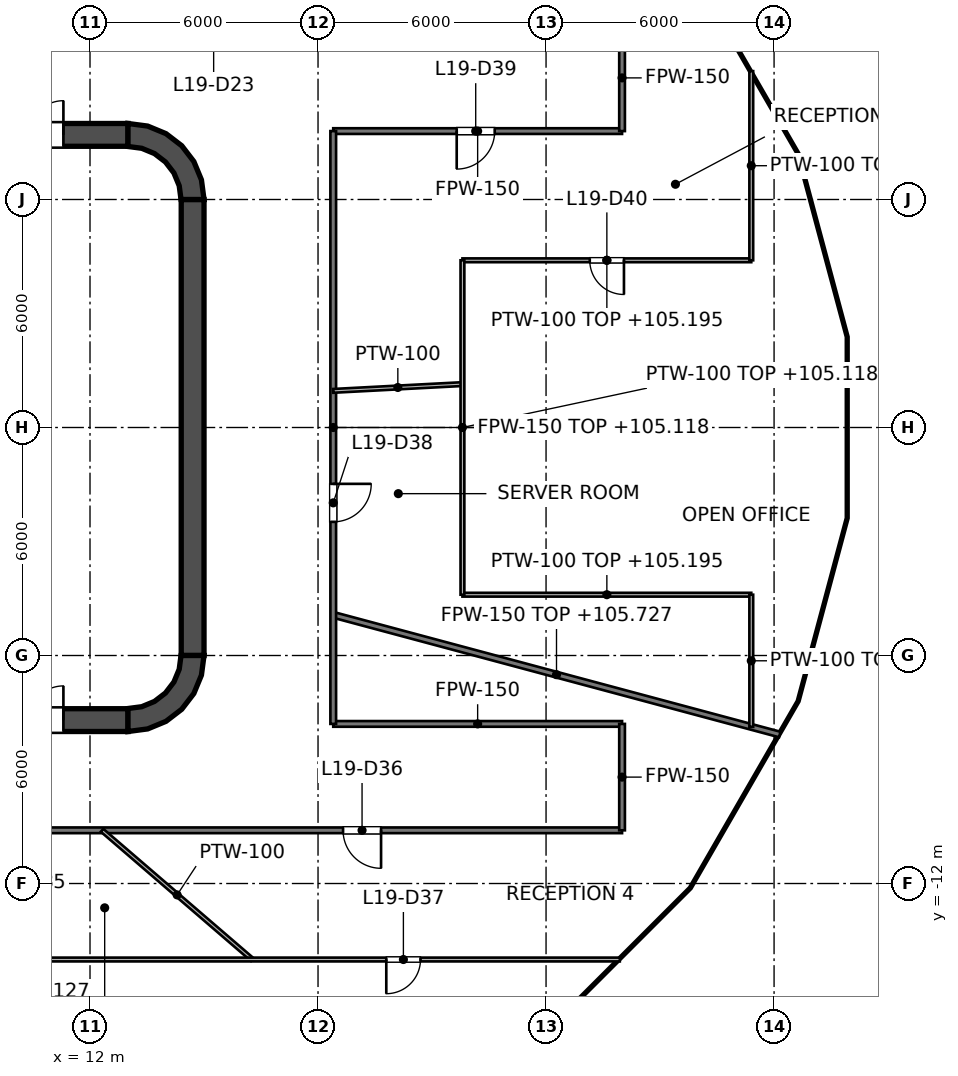
"""IFC4 building model, lengths in metres.
Left out: names, types, materials, properties, quantities, classifications, styles, units other than length and angle.
Written with IfcOpenShell. Run it as: python <this file> out.ifc"""

import sys

from ifc_helpers import new_model, si_unit, direction, frame, frame_2d, origin, place, context, subcontext, project, spatial, polyline, rectangle, outline, extrude, element, fill, save


model = new_model("IFC4")
c1 = context("Model", 3, precision=1e-05, world=origin(), true_north=direction((0.0, 1.0)))
c2 = subcontext(c1, "Body", "Model", "MODEL_VIEW")
j1 = project(units=[si_unit("LENGTHUNIT", "METRE"), si_unit("PLANEANGLEUNIT", "RADIAN")], contexts=[c1])
p1 = place(None, origin())
s1 = spatial("IfcSite", under=j1, at=p1, CompositionType="ELEMENT")
p2 = place(p1, origin())
s2 = spatial("IfcBuilding", under=s1, at=p2, CompositionType="ELEMENT")
p3 = place(p2, frame((0.0, 0.0, 102.0)))
s3 = spatial("IfcBuildingStorey", under=s2, at=p3, CompositionType="ELEMENT", Elevation=102.0)
p4 = place(p3, frame((-13.0, 7.7, 0.0), z_axis=(0.0, 0.0, 1.0), x_axis=(1.0, 0.0, 0.0)))
e1 = element("IfcWall", 1, at=p4, inside=s3, PredefinedType="SHEAR", context=c2, shape_type="SweptSolid", body=[
    extrude(rectangle(XDim=26.0, YDim=0.6, at=frame_2d((13.0, 0.0))), origin(), (0.0, 0.0, 1.0), 4.2),
])
p5 = place(p4, frame((1.7, 0.0, 0.0)))
e2 = element("IfcOpeningElement", 2, at=p5, cuts=e1, PredefinedType="OPENING", context=c2, shape_type="SweptSolid", body=[
    extrude(rectangle(XDim=1.8, YDim=2.1, at=frame_2d((0.9, 1.05))), frame((0.0, 0.3, 0.0), z_axis=(0.0, -1.0, 0.0), x_axis=(1.0, 0.0, 0.0)), (0.0, 0.0, 1.0), 0.6),
])
p6 = place(p4, frame((22.5, 0.0, 0.0)))
e3 = element("IfcOpeningElement", 3, at=p6, cuts=e1, PredefinedType="OPENING", context=c2, shape_type="SweptSolid", body=[
    extrude(rectangle(XDim=1.8, YDim=2.1, at=frame_2d((0.9, 1.05))), frame((0.0, 0.3, 0.0), z_axis=(0.0, -1.0, 0.0), x_axis=(1.0, 0.0, 0.0)), (0.0, 0.0, 1.0), 0.6),
])
p7 = place(p3, frame((-13.0, -7.7, 0.0), z_axis=(0.0, 0.0, 1.0), x_axis=(1.0, 0.0, 0.0)))
e4 = element("IfcWall", 4, at=p7, inside=s3, PredefinedType="SHEAR", context=c2, shape_type="SweptSolid", body=[
    extrude(rectangle(XDim=26.0, YDim=0.6, at=frame_2d((13.0, 0.0))), origin(), (0.0, 0.0, 1.0), 4.2),
])
p8 = place(p7, frame((1.7, 0.0, 0.0)))
e5 = element("IfcOpeningElement", 5, at=p8, cuts=e4, PredefinedType="OPENING", context=c2, shape_type="SweptSolid", body=[
    extrude(rectangle(XDim=1.8, YDim=2.1, at=frame_2d((0.9, 1.05))), frame((0.0, 0.3, 0.0), z_axis=(0.0, -1.0, 0.0), x_axis=(1.0, 0.0, 0.0)), (0.0, 0.0, 1.0), 0.6),
])
p9 = place(p7, frame((22.5, 0.0, 0.0)))
e6 = element("IfcOpeningElement", 6, at=p9, cuts=e4, PredefinedType="OPENING", context=c2, shape_type="SweptSolid", body=[
    extrude(rectangle(XDim=1.8, YDim=2.1, at=frame_2d((0.9, 1.05))), frame((0.0, 0.3, 0.0), z_axis=(0.0, -1.0, 0.0), x_axis=(1.0, 0.0, 0.0)), (0.0, 0.0, 1.0), 0.6),
])
p10 = place(p3, frame((14.7, -6.0, 0.0), z_axis=(0.0, 0.0, 1.0), x_axis=(0.0, 1.0, 0.0)))
e7 = element("IfcWall", 7, at=p10, inside=s3, PredefinedType="SHEAR", context=c2, shape_type="SweptSolid", body=[
    extrude(rectangle(XDim=12.0, YDim=0.6, at=frame_2d((6.0, 0.0))), origin(), (0.0, 0.0, 1.0), 4.2),
])
p11 = place(p3, origin())
e8 = element("IfcWall", 8, at=p11, inside=s3, PredefinedType="SHEAR", context=c2, shape_type="SweptSolid", body=[
    extrude(outline(polyline([(13.0, 8.0), (13.0, 7.395), (13.361, 7.347), (13.698, 7.208), (13.986, 6.986), (14.208, 6.698), (14.347, 6.361), (14.395, 6.0), (15.0, 6.0), (14.932, 6.518), (14.732, 7.0), (14.414, 7.414), (14.0, 7.732), (13.518, 7.932), (13.0, 8.0)])), origin(), (0.0, 0.0, 1.0), 4.2),
])
e9 = element("IfcWall", 9, at=p11, inside=s3, PredefinedType="SHEAR", context=c2, shape_type="SweptSolid", body=[
    extrude(outline(polyline([(15.0, -6.0), (14.395, -6.0), (14.347, -6.361), (14.208, -6.698), (13.986, -6.986), (13.698, -7.208), (13.361, -7.347), (13.0, -7.395), (13.0, -8.0), (13.518, -7.932), (14.0, -7.732), (14.414, -7.414), (14.732, -7.0), (14.932, -6.518), (15.0, -6.0)])), origin(), (0.0, 0.0, 1.0), 4.2),
])
p12 = place(p3, frame((11.8, -7.4, 0.0), z_axis=(0.0, 0.0, 1.0), x_axis=(0.0, 1.0, 0.0)))
e10 = element("IfcWall", 10, at=p12, inside=s3, PredefinedType="SOLIDWALL", context=c2, shape_type="SweptSolid", body=[
    extrude(rectangle(XDim=14.8, YDim=0.4, at=frame_2d((7.4, 0.0))), origin(), (0.0, 0.0, 1.0), 4.05),
])
p13 = place(p12, frame((11.2, 0.0, 0.0)))
e11 = element("IfcOpeningElement", 11, at=p13, cuts=e10, PredefinedType="OPENING", context=c2, shape_type="SweptSolid", body=[
    extrude(rectangle(XDim=1.1, YDim=2.1, at=frame_2d((0.55, 1.05))), frame((0.0, 0.2, 0.0), z_axis=(0.0, -1.0, 0.0), x_axis=(1.0, 0.0, 0.0)), (0.0, 0.0, 1.0), 0.4),
])
p14 = place(p12, frame((8.3, 0.0, 0.0)))
e12 = element("IfcOpeningElement", 12, at=p14, cuts=e10, PredefinedType="OPENING", context=c2, shape_type="SweptSolid", body=[
    extrude(rectangle(XDim=1.1, YDim=2.1, at=frame_2d((0.55, 1.05))), frame((0.0, 0.2, 0.0), z_axis=(0.0, -1.0, 0.0), x_axis=(1.0, 0.0, 0.0)), (0.0, 0.0, 1.0), 0.4),
])
p15 = place(p12, frame((5.4, 0.0, 0.0)))
e13 = element("IfcOpeningElement", 13, at=p15, cuts=e10, PredefinedType="OPENING", context=c2, shape_type="SweptSolid", body=[
    extrude(rectangle(XDim=1.1, YDim=2.1, at=frame_2d((0.55, 1.05))), frame((0.0, 0.2, 0.0), z_axis=(0.0, -1.0, 0.0), x_axis=(1.0, 0.0, 0.0)), (0.0, 0.0, 1.0), 0.4),
])
p16 = place(p12, frame((13.552, 0.0, 0.0)))
e14 = element("IfcOpeningElement", 14, at=p16, cuts=e10, PredefinedType="OPENING", context=c2, shape_type="SweptSolid", body=[
    extrude(rectangle(XDim=0.9, YDim=2.1, at=frame_2d((0.45, 1.05))), frame((0.0, 0.2, 0.0), z_axis=(0.0, -1.0, 0.0), x_axis=(1.0, 0.0, 0.0)), (0.0, 0.0, 1.0), 0.4),
])
p17 = place(p12, frame((0.347, 0.0, 0.0)))
e15 = element("IfcOpeningElement", 15, at=p17, cuts=e10, PredefinedType="OPENING", context=c2, shape_type="SweptSolid", body=[
    extrude(rectangle(XDim=0.9, YDim=2.1, at=frame_2d((0.45, 1.05))), frame((0.0, 0.2, 0.0), z_axis=(0.0, -1.0, 0.0), x_axis=(1.0, 0.0, 0.0)), (0.0, 0.0, 1.0), 0.4),
])
e16 = element("IfcWall", 16, at=p11, inside=s3, PredefinedType="SOLIDWALL", context=c2, shape_type="SweptSolid", body=[
    extrude(outline(polyline([(12.0, -5.675), (12.0, -5.925), (14.15, -5.925), (14.4, -5.925), (14.4, -5.675), (14.4, -3.025), (14.4, -2.775), (14.4, -0.125), (14.4, 0.125), (14.4, 2.775), (14.4, 3.025), (14.4, 5.675), (14.4, 5.925), (14.15, 5.925), (12.0, 5.925), (12.0, 5.675), (14.15, 5.675), (14.15, 3.025), (12.0, 3.025), (12.0, 2.775), (14.15, 2.775), (14.15, 0.125), (12.0, 0.125), (12.0, -0.125), (14.15, -0.125), (14.15, -2.775), (12.0, -2.775), (12.0, -3.025), (14.15, -3.025), (14.15, -5.675), (12.0, -5.675)])), origin(), (0.0, 0.0, 1.0), 4.05),
])
p18 = place(p3, frame((18.4, -4.93, 0.0), z_axis=(0.0, 0.0, 1.0), x_axis=(0.965910063501, -0.258877865465, 0.0)))
e17 = element("IfcWall", 17, at=p18, inside=s3, PredefinedType="PARTITIONING", context=c2, shape_type="SweptSolid", body=[
    extrude(rectangle(XDim=12.165, YDim=0.15, at=frame_2d((6.083, 0.0))), origin(), (0.0, 0.0, 1.0), 3.727),
])
p19 = place(p3, frame((-26.0, -10.6, 0.0), z_axis=(0.0, 0.0, 1.0), x_axis=(1.0, 0.0, 0.0)))
e18 = element("IfcWall", 18, at=p19, inside=s3, PredefinedType="PARTITIONING", context=c2, shape_type="SweptSolid", body=[
    extrude(rectangle(XDim=52.0, YDim=0.15, at=frame_2d((26.0, 0.0))), origin(), (0.0, 0.0, 1.0), 3.127),
])
p20 = place(p19, frame((9.34, 0.0, 0.0)))
e19 = element("IfcOpeningElement", 19, at=p20, cuts=e18, PredefinedType="OPENING", context=c2, shape_type="SweptSolid", body=[
    extrude(rectangle(XDim=1.2, YDim=2.1, at=frame_2d((0.6, 1.05))), frame((0.0, 0.075, 0.0), z_axis=(0.0, -1.0, 0.0), x_axis=(1.0, 0.0, 0.0)), (0.0, 0.0, 1.0), 0.15),
])
p21 = place(p19, frame((21.313, 0.0, 0.0)))
e20 = element("IfcOpeningElement", 20, at=p21, cuts=e18, PredefinedType="OPENING", context=c2, shape_type="SweptSolid", body=[
    extrude(rectangle(XDim=1.0, YDim=2.1, at=frame_2d((0.5, 1.05))), frame((0.0, 0.075, 0.0), z_axis=(0.0, -1.0, 0.0), x_axis=(1.0, 0.0, 0.0)), (0.0, 0.0, 1.0), 0.15),
])
p22 = place(p19, frame((25.793, 0.0, 0.0)))
e21 = element("IfcOpeningElement", 21, at=p22, cuts=e18, PredefinedType="OPENING", context=c2, shape_type="SweptSolid", body=[
    extrude(rectangle(XDim=1.0, YDim=2.1, at=frame_2d((0.5, 1.05))), frame((0.0, 0.075, 0.0), z_axis=(0.0, -1.0, 0.0), x_axis=(1.0, 0.0, 0.0)), (0.0, 0.0, 1.0), 0.15),
])
p23 = place(p19, frame((30.25, 0.0, 0.0)))
e22 = element("IfcOpeningElement", 22, at=p23, cuts=e18, PredefinedType="OPENING", context=c2, shape_type="SweptSolid", body=[
    extrude(rectangle(XDim=1.0, YDim=2.1, at=frame_2d((0.5, 1.05))), frame((0.0, 0.075, 0.0), z_axis=(0.0, -1.0, 0.0), x_axis=(1.0, 0.0, 0.0)), (0.0, 0.0, 1.0), 0.15),
])
p24 = place(p19, frame((34.989, 0.0, 0.0)))
e23 = element("IfcOpeningElement", 23, at=p24, cuts=e18, PredefinedType="OPENING", context=c2, shape_type="SweptSolid", body=[
    extrude(rectangle(XDim=1.0, YDim=2.1, at=frame_2d((0.5, 1.05))), frame((0.0, 0.075, 0.0), z_axis=(0.0, -1.0, 0.0), x_axis=(1.0, 0.0, 0.0)), (0.0, 0.0, 1.0), 0.15),
])
p25 = place(p19, frame((44.658, 0.0, 0.0)))
e24 = element("IfcOpeningElement", 24, at=p25, cuts=e18, PredefinedType="OPENING", context=c2, shape_type="SweptSolid", body=[
    extrude(rectangle(XDim=1.0, YDim=2.1, at=frame_2d((0.5, 1.05))), frame((0.0, 0.075, 0.0), z_axis=(0.0, -1.0, 0.0), x_axis=(1.0, 0.0, 0.0)), (0.0, 0.0, 1.0), 0.15),
])
p26 = place(p3, frame((18.4, -7.8, 0.0), z_axis=(0.0, 0.0, 1.0), x_axis=(1.0, 0.0, 0.0)))
e25 = element("IfcWall", 25, at=p26, inside=s3, PredefinedType="PARTITIONING", context=c2, shape_type="SweptSolid", body=[
    extrude(rectangle(XDim=7.6, YDim=0.15, at=frame_2d((3.8, 0.0))), origin(), (0.0, 0.0, 1.0), 3.276),
])
p27 = place(p3, frame((18.4, 7.8, 0.0), z_axis=(0.0, 0.0, 1.0), x_axis=(1.0, 0.0, 0.0)))
e26 = element("IfcWall", 26, at=p27, inside=s3, PredefinedType="PARTITIONING", context=c2, shape_type="SweptSolid", body=[
    extrude(rectangle(XDim=7.6, YDim=0.15, at=frame_2d((3.8, 0.0))), origin(), (0.0, 0.0, 1.0), 3.276),
])
p28 = place(p27, frame((3.249, 0.0, 0.0)))
e27 = element("IfcOpeningElement", 27, at=p28, cuts=e26, PredefinedType="OPENING", context=c2, shape_type="SweptSolid", body=[
    extrude(rectangle(XDim=1.0, YDim=2.1, at=frame_2d((0.5, 1.05))), frame((0.0, 0.075, 0.0), z_axis=(0.0, -1.0, 0.0), x_axis=(1.0, 0.0, 0.0)), (0.0, 0.0, 1.0), 0.15),
])
for number, where, z_axis, x_axis in (
    (28, (26.0, -10.6, 0.0), (0.0, 0.0, 1.0), (0.0, 1.0, 0.0)),
    (29, (26.0, 7.8, 0.0), (0.0, 0.0, 1.0), (0.0, 1.0, 0.0)),
):
    element("IfcWall", number, at=place(p3, frame(where, z_axis=z_axis, x_axis=x_axis)), inside=s3, PredefinedType="PARTITIONING", context=c2, shape_type="SweptSolid", body=[
        extrude(rectangle(XDim=2.8, YDim=0.15, at=frame_2d((1.4, 0.0))), origin(), (0.0, 0.0, 1.0), 3.276),
    ])
p29 = place(p3, frame((18.4, -7.8, 0.0), z_axis=(0.0, 0.0, 1.0), x_axis=(0.0, 1.0, 0.0)))
e30 = element("IfcWall", 30, at=p29, inside=s3, PredefinedType="PARTITIONING", context=c2, shape_type="SweptSolid", body=[
    extrude(rectangle(XDim=15.6, YDim=0.15, at=frame_2d((7.8, 0.0))), origin(), (0.0, 0.0, 1.0), 3.118),
])
p30 = place(p29, frame((5.317, 0.0, 0.0)))
e31 = element("IfcOpeningElement", 31, at=p30, cuts=e30, PredefinedType="OPENING", context=c2, shape_type="SweptSolid", body=[
    extrude(rectangle(XDim=1.0, YDim=2.1, at=frame_2d((0.5, 1.05))), frame((0.0, 0.075, 0.0), z_axis=(0.0, -1.0, 0.0), x_axis=(1.0, 0.0, 0.0)), (0.0, 0.0, 1.0), 0.15),
])
p31 = place(p3, frame((12.317, -10.6, 0.0), z_axis=(0.0, 0.0, 1.0), x_axis=(0.758005488553, -0.652248173109, 0.0)))
e32 = element("IfcWall", 32, at=p31, inside=s3, PredefinedType="PARTITIONING", context=c2, shape_type="SweptSolid", body=[
    extrude(rectangle(XDim=5.213, YDim=0.1, at=frame_2d((2.606, 0.0))), origin(), (0.0, 0.0, 1.0), 4.05),
])
p32 = place(p3, frame((-8.083, -14.0, 0.0), z_axis=(0.0, 0.0, 1.0), x_axis=(1.0, 0.0, 0.0)))
e33 = element("IfcWall", 33, at=p32, inside=s3, PredefinedType="PARTITIONING", context=c2, shape_type="SweptSolid", body=[
    extrude(rectangle(XDim=34.024, YDim=0.1, at=frame_2d((17.012, 0.0))), origin(), (0.0, 0.0, 1.0), 3.127),
])
p33 = place(p32, frame((7.52, 0.0, 0.0)))
e34 = element("IfcOpeningElement", 34, at=p33, cuts=e33, PredefinedType="OPENING", context=c2, shape_type="SweptSolid", body=[
    extrude(rectangle(XDim=1.8, YDim=2.1, at=frame_2d((0.9, 1.05))), frame((0.0, 0.05, 0.0), z_axis=(0.0, -1.0, 0.0), x_axis=(1.0, 0.0, 0.0)), (0.0, 0.0, 1.0), 0.1),
])
p34 = place(p32, frame((27.879, 0.0, 0.0)))
e35 = element("IfcOpeningElement", 35, at=p34, cuts=e33, PredefinedType="OPENING", context=c2, shape_type="SweptSolid", body=[
    extrude(rectangle(XDim=0.9, YDim=2.1, at=frame_2d((0.45, 1.05))), frame((0.0, 0.05, 0.0), z_axis=(0.0, -1.0, 0.0), x_axis=(1.0, 0.0, 0.0)), (0.0, 0.0, 1.0), 0.1),
])
p35 = place(p3, frame((21.8, -4.4, 0.0), z_axis=(0.0, 0.0, 1.0), x_axis=(1.0, 0.0, 0.0)))
e36 = element("IfcWall", 36, at=p35, inside=s3, PredefinedType="PARTITIONING", context=c2, shape_type="SweptSolid", body=[
    extrude(rectangle(XDim=7.6, YDim=0.1, at=frame_2d((3.8, 0.0))), origin(), (0.0, 0.0, 1.0), 3.195),
])
p36 = place(p3, frame((21.8, 4.4, 0.0), z_axis=(0.0, 0.0, 1.0), x_axis=(1.0, 0.0, 0.0)))
e37 = element("IfcWall", 37, at=p36, inside=s3, PredefinedType="PARTITIONING", context=c2, shape_type="SweptSolid", body=[
    extrude(rectangle(XDim=7.6, YDim=0.1, at=frame_2d((3.8, 0.0))), origin(), (0.0, 0.0, 1.0), 3.195),
])
p37 = place(p36, frame((3.35, 0.0, 0.0)))
e38 = element("IfcOpeningElement", 38, at=p37, cuts=e37, PredefinedType="OPENING", context=c2, shape_type="SweptSolid", body=[
    extrude(rectangle(XDim=0.9, YDim=2.1, at=frame_2d((0.45, 1.05))), frame((0.0, 0.05, 0.0), z_axis=(0.0, -1.0, 0.0), x_axis=(1.0, 0.0, 0.0)), (0.0, 0.0, 1.0), 0.1),
])
p38 = place(p3, frame((18.4, 0.964, 0.0), z_axis=(0.0, 0.0, 1.0), x_axis=(0.998632842418, 0.052272804058, 0.0)))
e39 = element("IfcWall", 39, at=p38, inside=s3, PredefinedType="PARTITIONING", context=c2, shape_type="SweptSolid", body=[
    extrude(rectangle(XDim=3.405, YDim=0.1, at=frame_2d((1.702, 0.0))), origin(), (0.0, 0.0, 1.0), 4.05),
])
p39 = place(p3, frame((29.4, -7.878, 0.0), z_axis=(0.0, 0.0, 1.0), x_axis=(0.0, 1.0, 0.0)))
e40 = element("IfcWall", 40, at=p39, inside=s3, PredefinedType="PARTITIONING", context=c2, shape_type="SweptSolid", body=[
    extrude(rectangle(XDim=3.478, YDim=0.1, at=frame_2d((1.739, 0.0))), origin(), (0.0, 0.0, 1.0), 3.127),
])
p40 = place(p3, frame((29.4, 4.4, 0.0), z_axis=(0.0, 0.0, 1.0), x_axis=(0.0, 1.0, 0.0)))
e41 = element("IfcWall", 41, at=p40, inside=s3, PredefinedType="PARTITIONING", context=c2, shape_type="SweptSolid", body=[
    extrude(rectangle(XDim=4.978, YDim=0.1, at=frame_2d((2.489, 0.0))), origin(), (0.0, 0.0, 1.0), 3.127),
])
p41 = place(p3, frame((21.8, -4.4, 0.0), z_axis=(0.0, 0.0, 1.0), x_axis=(0.0, 1.0, 0.0)))
e42 = element("IfcWall", 42, at=p41, inside=s3, PredefinedType="PARTITIONING", context=c2, shape_type="SweptSolid", body=[
    extrude(rectangle(XDim=8.8, YDim=0.1, at=frame_2d((4.4, 0.0))), origin(), (0.0, 0.0, 1.0), 3.118),
])
p42 = place(p13, origin())
e43 = element("IfcDoor", 43, at=p42, inside=s3, OperationType="DOUBLE_DOOR_SLIDING", PredefinedType="DOOR", context=c2, shape_type="SweptSolid", body=[
    extrude(rectangle(XDim=1.1, YDim=2.1, at=frame_2d((0.55, 1.05))), frame((0.0, 0.025, 0.0), z_axis=(0.0, -1.0, 0.0), x_axis=(1.0, 0.0, 0.0)), (0.0, 0.0, 1.0), 0.05),
])
fill(e11, e43)
p43 = place(p14, origin())
e44 = element("IfcDoor", 44, at=p43, inside=s3, OperationType="DOUBLE_DOOR_SLIDING", PredefinedType="DOOR", context=c2, shape_type="SweptSolid", body=[
    extrude(rectangle(XDim=1.1, YDim=2.1, at=frame_2d((0.55, 1.05))), frame((0.0, 0.025, 0.0), z_axis=(0.0, -1.0, 0.0), x_axis=(1.0, 0.0, 0.0)), (0.0, 0.0, 1.0), 0.05),
])
fill(e12, e44)
p44 = place(p15, origin())
e45 = element("IfcDoor", 45, at=p44, inside=s3, OperationType="DOUBLE_DOOR_SLIDING", PredefinedType="DOOR", context=c2, shape_type="SweptSolid", body=[
    extrude(rectangle(XDim=1.1, YDim=2.1, at=frame_2d((0.55, 1.05))), frame((0.0, 0.025, 0.0), z_axis=(0.0, -1.0, 0.0), x_axis=(1.0, 0.0, 0.0)), (0.0, 0.0, 1.0), 0.05),
])
fill(e13, e45)
p45 = place(p16, origin())
e46 = element("IfcDoor", 46, at=p45, inside=s3, OperationType="SINGLE_SWING_RIGHT", PredefinedType="DOOR", context=c2, shape_type="SweptSolid", body=[
    extrude(rectangle(XDim=0.9, YDim=2.1, at=frame_2d((0.45, 1.05))), frame((0.0, 0.025, 0.0), z_axis=(0.0, -1.0, 0.0), x_axis=(1.0, 0.0, 0.0)), (0.0, 0.0, 1.0), 0.05),
])
fill(e14, e46)
p46 = place(p17, origin())
e47 = element("IfcDoor", 47, at=p46, inside=s3, OperationType="SINGLE_SWING_RIGHT", PredefinedType="DOOR", context=c2, shape_type="SweptSolid", body=[
    extrude(rectangle(XDim=0.9, YDim=2.1, at=frame_2d((0.45, 1.05))), frame((0.0, 0.025, 0.0), z_axis=(0.0, -1.0, 0.0), x_axis=(1.0, 0.0, 0.0)), (0.0, 0.0, 1.0), 0.05),
])
fill(e15, e47)
p47 = place(p6, origin())
e48 = element("IfcDoor", 48, at=p47, inside=s3, OperationType="DOUBLE_DOOR_SINGLE_SWING", PredefinedType="DOOR", context=c2, shape_type="SweptSolid", body=[
    extrude(rectangle(XDim=1.8, YDim=2.1, at=frame_2d((0.9, 1.05))), frame((0.0, 0.025, 0.0), z_axis=(0.0, -1.0, 0.0), x_axis=(1.0, 0.0, 0.0)), (0.0, 0.0, 1.0), 0.05),
])
fill(e3, e48)
p48 = place(p9, origin())
e49 = element("IfcDoor", 49, at=p48, inside=s3, OperationType="DOUBLE_DOOR_SINGLE_SWING", PredefinedType="DOOR", context=c2, shape_type="SweptSolid", body=[
    extrude(rectangle(XDim=1.8, YDim=2.1, at=frame_2d((0.9, 1.05))), frame((0.0, 0.025, 0.0), z_axis=(0.0, -1.0, 0.0), x_axis=(1.0, 0.0, 0.0)), (0.0, 0.0, 1.0), 0.05),
])
fill(e6, e49)
p49 = place(p25, origin())
e50 = element("IfcDoor", 50, at=p49, inside=s3, OperationType="SINGLE_SWING_RIGHT", PredefinedType="DOOR", context=c2, shape_type="SweptSolid", body=[
    extrude(rectangle(XDim=1.0, YDim=2.1, at=frame_2d((0.5, 1.05))), frame((0.0, 0.025, 0.0), z_axis=(0.0, -1.0, 0.0), x_axis=(1.0, 0.0, 0.0)), (0.0, 0.0, 1.0), 0.05),
])
fill(e24, e50)
p50 = place(p34, origin())
e51 = element("IfcDoor", 51, at=p50, inside=s3, OperationType="SINGLE_SWING_LEFT", PredefinedType="DOOR", context=c2, shape_type="SweptSolid", body=[
    extrude(rectangle(XDim=0.9, YDim=2.1, at=frame_2d((0.45, 1.05))), frame((0.0, 0.025, 0.0), z_axis=(0.0, -1.0, 0.0), x_axis=(1.0, 0.0, 0.0)), (0.0, 0.0, 1.0), 0.05),
])
fill(e35, e51)
p51 = place(p30, origin())
e52 = element("IfcDoor", 52, at=p51, inside=s3, OperationType="SINGLE_SWING_RIGHT", PredefinedType="DOOR", context=c2, shape_type="SweptSolid", body=[
    extrude(rectangle(XDim=1.0, YDim=2.1, at=frame_2d((0.5, 1.05))), frame((0.0, 0.025, 0.0), z_axis=(0.0, -1.0, 0.0), x_axis=(1.0, 0.0, 0.0)), (0.0, 0.0, 1.0), 0.05),
])
fill(e31, e52)
p52 = place(p28, origin())
e53 = element("IfcDoor", 53, at=p52, inside=s3, OperationType="SINGLE_SWING_LEFT", PredefinedType="DOOR", context=c2, shape_type="SweptSolid", body=[
    extrude(rectangle(XDim=1.0, YDim=2.1, at=frame_2d((0.5, 1.05))), frame((0.0, 0.025, 0.0), z_axis=(0.0, -1.0, 0.0), x_axis=(1.0, 0.0, 0.0)), (0.0, 0.0, 1.0), 0.05),
])
fill(e27, e53)
p53 = place(p37, origin())
e54 = element("IfcDoor", 54, at=p53, inside=s3, OperationType="SINGLE_SWING_RIGHT", PredefinedType="DOOR", context=c2, shape_type="SweptSolid", body=[
    extrude(rectangle(XDim=0.9, YDim=2.1, at=frame_2d((0.45, 1.05))), frame((0.0, 0.025, 0.0), z_axis=(0.0, -1.0, 0.0), x_axis=(1.0, 0.0, 0.0)), (0.0, 0.0, 1.0), 0.05),
])
fill(e38, e54)
save(model, sys.argv[1])
